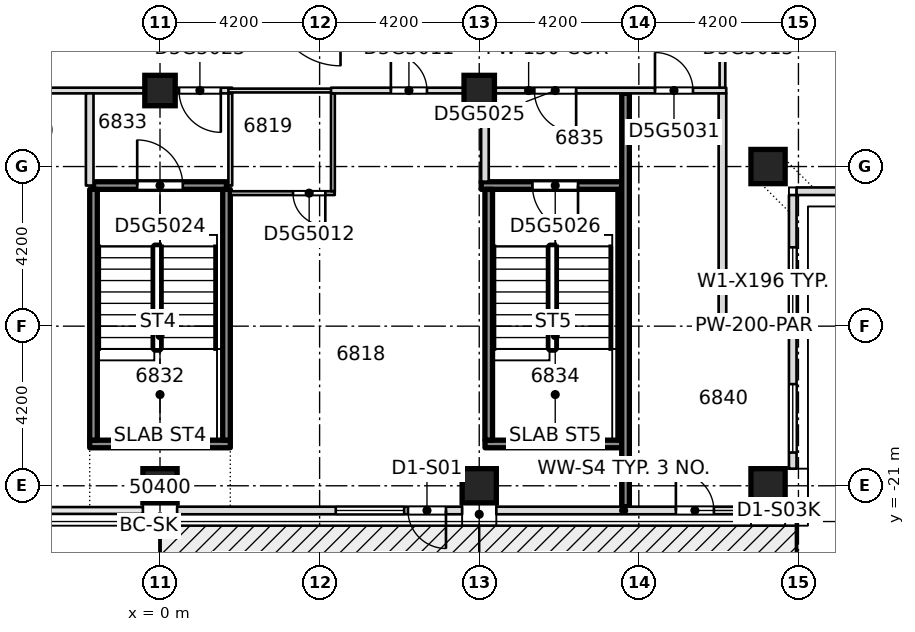
"""IFC4 building model, lengths in metres.
Left out: names, types, materials, properties, quantities, classifications, styles, units other than length and angle.
Written with IfcOpenShell. Run it as: python <this file> out.ifc"""

import sys

from ifc_helpers import new_model, si_unit, direction, frame, frame_2d, origin, origin_2d, place, context, subcontext, project, spatial, rectangle, extrude, element, fill, save


model = new_model("IFC4")
c1 = context("Model", 3, precision=1e-05, world=origin(), true_north=direction((0.0, 1.0)))
c2 = subcontext(c1, "Body", "Model", "MODEL_VIEW")
j1 = project(units=[si_unit("LENGTHUNIT", "METRE"), si_unit("PLANEANGLEUNIT", "RADIAN")], contexts=[c1])
p1 = place(None, origin())
s1 = spatial("IfcSite", under=j1, at=p1, CompositionType="ELEMENT")
p2 = place(p1, origin())
s2 = spatial("IfcBuilding", under=s1, at=p2, CompositionType="ELEMENT")
p3 = place(p2, frame((0.0, 0.0, 257.95)))
s3 = spatial("IfcBuildingStorey", under=s2, at=p3, CompositionType="ELEMENT", Elevation=257.95)
for number, where, z_axis, x_axis in (
    (1, (0.0, -21.0, -0.4), (0.0, 0.0, 1.0), (1.0, 0.0, 0.0)),
    (2, (8.4, -21.0, -0.4), (0.0, 0.0, 1.0), (1.0, 0.0, 0.0)),
    (3, (16.0, -21.0, -0.4), (0.0, 0.0, 1.0), (1.0, 0.0, 0.0)),
    (4, (16.0, -12.6, -0.4), (0.0, 0.0, 1.0), (1.0, 0.0, 0.0)),
):
    element("IfcColumn", number, at=place(p3, frame(where, z_axis=z_axis, x_axis=x_axis)), inside=s3, PredefinedType="COLUMN", context=c2, shape_type="SweptSolid", body=[
        extrude(rectangle(XDim=0.9, YDim=0.9, at=origin_2d()), origin(), (0.0, 0.0, 1.0), 3.45),
    ])
for number, where, z_axis, x_axis in (
    (5, (0.0, -10.6, -0.4), (0.0, 0.0, 1.0), (1.0, 0.0, 0.0)),
    (6, (8.4, -10.6, -0.4), (0.0, 0.0, 1.0), (1.0, 0.0, 0.0)),
):
    element("IfcColumn", number, at=place(p3, frame(where, z_axis=z_axis, x_axis=x_axis)), inside=s3, PredefinedType="COLUMN", context=c2, shape_type="SweptSolid", body=[
        extrude(rectangle(XDim=0.8, YDim=0.8, at=origin_2d()), origin(), (0.0, 0.0, 1.0), 3.45),
    ])
p4 = place(p3, frame((8.552, -19.9, 0.0), z_axis=(0.0, 0.0, 1.0), x_axis=(1.0, 0.0, 0.0)))
e7 = element("IfcWall", 7, at=p4, inside=s3, PredefinedType="SOLIDWALL", context=c2, shape_type="SweptSolid", body=[
    extrude(rectangle(XDim=3.696, YDim=0.2, at=frame_2d((1.848, 0.0))), origin(), (0.0, 0.0, 1.0), 3.05),
])
p5 = place(p3, frame((14.702, -16.8, 0.0), z_axis=(0.0, 0.0, 1.0), x_axis=(1.0, 0.0, 0.0)))
e8 = element("IfcWall", 8, at=p5, inside=s3, PredefinedType="PARTITIONING", context=c2, shape_type="SweptSolid", body=[
    extrude(rectangle(XDim=1.848, YDim=0.2, at=frame_2d((0.924, 0.0))), origin(), (0.0, 0.0, 1.0), 3.05),
])
p6 = place(p3, frame((1.85, -13.3, 0.0), z_axis=(0.0, 0.0, 1.0), x_axis=(1.0, 0.0, 0.0)))
e9 = element("IfcWall", 9, at=p6, inside=s3, PredefinedType="PARTITIONING", context=c2, shape_type="SweptSolid", body=[
    extrude(rectangle(XDim=2.748, YDim=0.1, at=frame_2d((1.374, 0.0))), origin(), (0.0, 0.0, 1.0), 3.05),
])
p7 = place(p6, frame((1.65, 0.0, 0.0)))
e10 = element("IfcOpeningElement", 10, at=p7, cuts=e9, PredefinedType="OPENING", context=c2, shape_type="SweptSolid", body=[
    extrude(rectangle(XDim=0.85, YDim=2.1, at=frame_2d((0.425, 1.05))), frame((0.0, 0.06, 0.0), z_axis=(0.0, -1.0, 0.0), x_axis=(1.0, 0.0, 0.0)), (0.0, 0.0, 1.0), 0.12),
])
p8 = place(p3, frame((-1.75, -13.1, 0.0), z_axis=(0.0, 0.0, 1.0), x_axis=(1.0, 0.0, 0.0)))
e11 = element("IfcWall", 11, at=p8, inside=s3, PredefinedType="SOLIDWALL", context=c2, shape_type="SweptSolid", body=[
    extrude(rectangle(XDim=3.5, YDim=0.2, at=frame_2d((1.75, 0.0))), origin(), (0.0, 0.0, 1.0), 3.05),
])
p9 = place(p8, frame((1.15, 0.0, 0.0)))
e12 = element("IfcOpeningElement", 12, at=p9, cuts=e11, PredefinedType="OPENING", context=c2, shape_type="SweptSolid", body=[
    extrude(rectangle(XDim=1.2, YDim=2.1, at=frame_2d((0.6, 1.05))), frame((0.0, 0.11, 0.0), z_axis=(0.0, -1.0, 0.0), x_axis=(1.0, 0.0, 0.0)), (0.0, 0.0, 1.0), 0.22),
])
p10 = place(p3, frame((8.452, -13.1, 0.0), z_axis=(0.0, 0.0, 1.0), x_axis=(1.0, 0.0, 0.0)))
e13 = element("IfcWall", 13, at=p10, inside=s3, PredefinedType="SOLIDWALL", context=c2, shape_type="SweptSolid", body=[
    extrude(rectangle(XDim=3.696, YDim=0.2, at=frame_2d((1.848, 0.0))), origin(), (0.0, 0.0, 1.0), 3.05),
])
p11 = place(p10, frame((1.348, 0.0, 0.0)))
e14 = element("IfcOpeningElement", 14, at=p11, cuts=e13, PredefinedType="OPENING", context=c2, shape_type="SweptSolid", body=[
    extrude(rectangle(XDim=1.2, YDim=2.1, at=frame_2d((0.6, 1.05))), frame((0.0, 0.11, 0.0), z_axis=(0.0, -1.0, 0.0), x_axis=(1.0, 0.0, 0.0)), (0.0, 0.0, 1.0), 0.22),
])
p12 = place(p3, frame((-6.2, -10.6, 0.0), z_axis=(0.0, 0.0, 1.0), x_axis=(1.0, 0.0, 0.0)))
e15 = element("IfcWall", 15, at=p12, inside=s3, PredefinedType="PARTITIONING", context=c2, shape_type="SweptSolid", body=[
    extrude(rectangle(XDim=8.1, YDim=0.15, at=frame_2d((4.05, 0.0))), origin(), (0.0, 0.0, 1.0), 3.05),
])
p13 = place(p12, frame((1.725, 0.0, 0.0)))
e16 = element("IfcOpeningElement", 16, at=p13, cuts=e15, PredefinedType="OPENING", context=c2, shape_type="SweptSolid", body=[
    extrude(rectangle(XDim=0.95, YDim=2.1, at=frame_2d((0.475, 1.05))), frame((0.0, 0.085, 0.0), z_axis=(0.0, -1.0, 0.0), x_axis=(1.0, 0.0, 0.0)), (0.0, 0.0, 1.0), 0.17),
])
p14 = place(p12, frame((6.7, 0.0, 0.0)))
e17 = element("IfcOpeningElement", 17, at=p14, cuts=e15, PredefinedType="OPENING", context=c2, shape_type="SweptSolid", body=[
    extrude(rectangle(XDim=1.1, YDim=2.1, at=frame_2d((0.55, 1.05))), frame((0.0, 0.085, 0.0), z_axis=(0.0, -1.0, 0.0), x_axis=(1.0, 0.0, 0.0)), (0.0, 0.0, 1.0), 0.17),
])
p15 = place(p3, frame((1.8, -10.6, 0.0), z_axis=(0.0, 0.0, 1.0), x_axis=(1.0, 0.0, 0.0)))
e18 = element("IfcWall", 18, at=p15, inside=s3, PredefinedType="PARTITIONING", context=c2, shape_type="SweptSolid", body=[
    extrude(rectangle(XDim=2.8, YDim=0.1, at=frame_2d((1.4, 0.0))), origin(), (0.0, 0.0, 1.0), 3.05),
])
p16 = place(p3, frame((4.5, -10.6, 0.0), z_axis=(0.0, 0.0, 1.0), x_axis=(1.0, 0.0, 0.0)))
e19 = element("IfcWall", 19, at=p16, inside=s3, PredefinedType="PARTITIONING", context=c2, shape_type="SweptSolid", body=[
    extrude(rectangle(XDim=10.4, YDim=0.15, at=frame_2d((5.2, 0.0))), origin(), (0.0, 0.0, 1.0), 3.05),
])
p17 = place(p16, frame((1.575, 0.0, 0.0)))
e20 = element("IfcOpeningElement", 20, at=p17, cuts=e19, PredefinedType="OPENING", context=c2, shape_type="SweptSolid", body=[
    extrude(rectangle(XDim=0.95, YDim=2.1, at=frame_2d((0.475, 1.05))), frame((0.0, 0.085, 0.0), z_axis=(0.0, -1.0, 0.0), x_axis=(1.0, 0.0, 0.0)), (0.0, 0.0, 1.0), 0.17),
])
p18 = place(p16, frame((5.35, 0.0, 0.0)))
e21 = element("IfcOpeningElement", 21, at=p18, cuts=e19, PredefinedType="OPENING", context=c2, shape_type="SweptSolid", body=[
    extrude(rectangle(XDim=1.1, YDim=2.1, at=frame_2d((0.55, 1.05))), frame((0.0, 0.085, 0.0), z_axis=(0.0, -1.0, 0.0), x_axis=(1.0, 0.0, 0.0)), (0.0, 0.0, 1.0), 0.17),
])
p19 = place(p16, frame((8.525, 0.0, 0.0)))
e22 = element("IfcOpeningElement", 22, at=p19, cuts=e19, PredefinedType="OPENING", context=c2, shape_type="SweptSolid", body=[
    extrude(rectangle(XDim=1.0, YDim=2.1, at=frame_2d((0.5, 1.05))), frame((0.0, 0.085, 0.0), z_axis=(0.0, -1.0, 0.0), x_axis=(1.0, 0.0, 0.0)), (0.0, 0.0, 1.0), 0.17),
])
p20 = place(p3, frame((-1.85, -13.1, 0.0), z_axis=(0.0, 0.0, 1.0), x_axis=(0.0, 1.0, 0.0)))
e23 = element("IfcWall", 23, at=p20, inside=s3, PredefinedType="PARTITIONING", context=c2, shape_type="SweptSolid", body=[
    extrude(rectangle(XDim=2.425, YDim=0.2, at=frame_2d((1.212, 0.0))), origin(), (0.0, 0.0, 1.0), 3.05),
])
p21 = place(p3, frame((1.85, -13.1, 0.0), z_axis=(0.0, 0.0, 1.0), x_axis=(0.0, 1.0, 0.0)))
e24 = element("IfcWall", 24, at=p21, inside=s3, PredefinedType="PARTITIONING", context=c2, shape_type="SweptSolid", body=[
    extrude(rectangle(XDim=2.425, YDim=0.1, at=frame_2d((1.212, 0.0))), origin(), (0.0, 0.0, 1.0), 3.05),
])
p22 = place(p3, frame((4.55, -13.248, 0.0), z_axis=(0.0, 0.0, 1.0), x_axis=(0.0, 1.0, 0.0)))
e25 = element("IfcWall", 25, at=p22, inside=s3, PredefinedType="PARTITIONING", context=c2, shape_type="SweptSolid", body=[
    extrude(rectangle(XDim=2.573, YDim=0.1, at=frame_2d((1.287, 0.0))), origin(), (0.0, 0.0, 1.0), 3.05),
])
p23 = place(p3, frame((8.55, -12.998, 0.0), z_axis=(0.0, 0.0, 1.0), x_axis=(0.0, 1.0, 0.0)))
e26 = element("IfcWall", 26, at=p23, inside=s3, PredefinedType="PARTITIONING", context=c2, shape_type="SweptSolid", body=[
    extrude(rectangle(XDim=2.323, YDim=0.2, at=frame_2d((1.162, 0.0))), origin(), (0.0, 0.0, 1.0), 3.05),
])
for number, where, z_axis, x_axis in (
    (27, (8.65, -19.798, 0.0), (0.0, 0.0, 1.0), (0.0, 1.0, 0.0)),
    (28, (12.15, -19.798, 0.0), (0.0, 0.0, 1.0), (0.0, 1.0, 0.0)),
):
    element("IfcWall", number, at=place(p3, frame(where, z_axis=z_axis, x_axis=x_axis)), inside=s3, PredefinedType="SOLIDWALL", context=c2, shape_type="SweptSolid", body=[
        extrude(rectangle(XDim=6.596, YDim=0.2, at=frame_2d((3.298, 0.0))), origin(), (0.0, 0.0, 1.0), 3.05),
    ])
p24 = place(p3, frame((14.8, -16.698, 0.0), z_axis=(0.0, 0.0, 1.0), x_axis=(0.0, 1.0, 0.0)))
e29 = element("IfcWall", 29, at=p24, inside=s3, PredefinedType="PARTITIONING", context=c2, shape_type="SweptSolid", body=[
    extrude(rectangle(XDim=6.023, YDim=0.2, at=frame_2d((3.011, 0.0))), origin(), (0.0, 0.0, 1.0), 3.05),
])
p25 = place(p3, frame((14.8, -10.525, 0.0), z_axis=(0.0, 0.0, 1.0), x_axis=(0.0, 1.0, 0.0)))
e30 = element("IfcWall", 30, at=p25, inside=s3, PredefinedType="PARTITIONING", context=c2, shape_type="SweptSolid", body=[
    extrude(rectangle(XDim=2.05, YDim=0.15, at=frame_2d((1.025, 0.0))), origin(), (0.0, 0.0, 1.0), 3.05),
])
p26 = place(p3, frame((0.45, -21.65, 0.0), z_axis=(0.0, 0.0, 1.0), x_axis=(1.0, 0.0, 0.0)))
e31 = element("IfcWall", 31, at=p26, inside=s3, PredefinedType="STANDARD", context=c2, shape_type="SweptSolid", body=[
    extrude(rectangle(XDim=7.5, YDim=0.2, at=frame_2d((3.75, 0.0))), origin(), (0.0, 0.0, 1.0), 3.05),
])
p27 = place(p26, frame((4.175, 0.0, 0.2)))
e32 = element("IfcOpeningElement", 32, at=p27, cuts=e31, PredefinedType="OPENING", context=c2, shape_type="SweptSolid", body=[
    extrude(rectangle(XDim=1.8, YDim=2.65, at=frame_2d((0.9, 1.325))), frame((0.0, 0.11, 0.0), z_axis=(0.0, -1.0, 0.0), x_axis=(1.0, 0.0, 0.0)), (0.0, 0.0, 1.0), 0.22),
])
p28 = place(p26, frame((6.075, 0.0, 0.0)))
e33 = element("IfcOpeningElement", 33, at=p28, cuts=e31, PredefinedType="OPENING", context=c2, shape_type="SweptSolid", body=[
    extrude(rectangle(XDim=1.0, YDim=2.4, at=frame_2d((0.5, 1.2))), frame((0.0, 0.11, 0.0), z_axis=(0.0, -1.0, 0.0), x_axis=(1.0, 0.0, 0.0)), (0.0, 0.0, 1.0), 0.22),
])
p29 = place(p3, frame((8.85, -21.65, 0.0), z_axis=(0.0, 0.0, 1.0), x_axis=(1.0, 0.0, 0.0)))
e34 = element("IfcWall", 34, at=p29, inside=s3, PredefinedType="STANDARD", context=c2, shape_type="SweptSolid", body=[
    extrude(rectangle(XDim=6.7, YDim=0.2, at=frame_2d((3.35, 0.0))), origin(), (0.0, 0.0, 1.0), 3.05),
])
p30 = place(p29, frame((4.725, 0.0, 0.0)))
e35 = element("IfcOpeningElement", 35, at=p30, cuts=e34, PredefinedType="OPENING", context=c2, shape_type="SweptSolid", body=[
    extrude(rectangle(XDim=1.0, YDim=2.4, at=frame_2d((0.5, 1.2))), frame((0.0, 0.11, 0.0), z_axis=(0.0, -1.0, 0.0), x_axis=(1.0, 0.0, 0.0)), (0.0, 0.0, 1.0), 0.22),
])
p31 = place(p3, frame((16.65, -20.55, 0.0), z_axis=(0.0, 0.0, 1.0), x_axis=(0.0, 1.0, 0.0)))
e36 = element("IfcWall", 36, at=p31, inside=s3, PredefinedType="STANDARD", context=c2, shape_type="SweptSolid", body=[
    extrude(rectangle(XDim=7.2, YDim=0.2, at=frame_2d((3.6, 0.0))), origin(), (0.0, 0.0, 1.0), 3.05),
])
p32 = place(p31, frame((0.425, 0.0, 0.2)))
e37 = element("IfcOpeningElement", 37, at=p32, cuts=e36, PredefinedType="OPENING", context=c2, shape_type="SweptSolid", body=[
    extrude(rectangle(XDim=1.8, YDim=2.65, at=frame_2d((0.9, 1.325))), frame((0.0, 0.11, 0.0), z_axis=(0.0, -1.0, 0.0), x_axis=(1.0, 0.0, 0.0)), (0.0, 0.0, 1.0), 0.22),
])
p33 = place(p31, frame((4.025, 0.0, 0.2)))
e38 = element("IfcOpeningElement", 38, at=p33, cuts=e36, PredefinedType="OPENING", context=c2, shape_type="SweptSolid", body=[
    extrude(rectangle(XDim=1.8, YDim=2.65, at=frame_2d((0.9, 1.325))), frame((0.0, 0.11, 0.0), z_axis=(0.0, -1.0, 0.0), x_axis=(1.0, 0.0, 0.0)), (0.0, 0.0, 1.0), 0.22),
])
p34 = place(p3, frame((16.75, -13.25, 0.0), z_axis=(0.0, 0.0, 1.0), x_axis=(1.0, 0.0, 0.0)))
e39 = element("IfcWall", 39, at=p34, inside=s3, PredefinedType="STANDARD", context=c2, shape_type="SweptSolid", body=[
    extrude(rectangle(XDim=8.0, YDim=0.2, at=frame_2d((4.0, 0.0))), origin(), (0.0, 0.0, 1.0), 3.05),
])
p35 = place(p3, frame((-1.85, -19.9, 0.0), z_axis=(0.0, 0.0, 1.0), x_axis=(1.0, 0.0, 0.0)))
e40 = element("IfcWall", 40, at=p35, inside=s3, PredefinedType="SOLIDWALL", context=c2, shape_type="SweptSolid", body=[
    extrude(rectangle(XDim=3.7, YDim=0.2, at=frame_2d((1.85, 0.0))), origin(), (0.0, 0.0, 1.0), 3.05),
])
for number, where, z_axis, x_axis in (
    (41, (-1.75, -19.8, 0.0), (0.0, 0.0, 1.0), (0.0, 1.0, 0.0)),
    (42, (1.75, -19.8, 0.0), (0.0, 0.0, 1.0), (0.0, 1.0, 0.0)),
):
    element("IfcWall", number, at=place(p3, frame(where, z_axis=z_axis, x_axis=x_axis)), inside=s3, PredefinedType="SOLIDWALL", context=c2, shape_type="SweptSolid", body=[
        extrude(rectangle(XDim=6.6, YDim=0.2, at=frame_2d((3.3, 0.0))), origin(), (0.0, 0.0, 1.0), 3.05),
    ])
p36 = place(p3, frame((12.25, -21.55, 0.0), z_axis=(0.0, 0.0, 1.0), x_axis=(0.0, 1.0, 0.0)))
e43 = element("IfcWall", 43, at=p36, inside=s3, PredefinedType="SOLIDWALL", context=c2, shape_type="SweptSolid", body=[
    extrude(rectangle(XDim=10.875, YDim=0.2, at=frame_2d((5.438, 0.0))), origin(), (0.0, 0.0, 1.0), 3.05),
])
p37 = place(p17, origin())
e44 = element("IfcDoor", 44, at=p37, inside=s3, OperationType="SINGLE_SWING_LEFT", PredefinedType="DOOR", context=c2, shape_type="SweptSolid", body=[
    extrude(rectangle(XDim=0.95, YDim=2.1, at=frame_2d((0.475, 1.05))), frame((0.0, 0.025, 0.0), z_axis=(0.0, -1.0, 0.0), x_axis=(1.0, 0.0, 0.0)), (0.0, 0.0, 1.0), 0.05),
])
fill(e20, e44)
p38 = place(p7, origin())
e45 = element("IfcDoor", 45, at=p38, inside=s3, OperationType="SINGLE_SWING_RIGHT", PredefinedType="DOOR", context=c2, shape_type="SweptSolid", body=[
    extrude(rectangle(XDim=0.85, YDim=2.1, at=frame_2d((0.425, 1.05))), frame((0.0, 0.025, 0.0), z_axis=(0.0, -1.0, 0.0), x_axis=(1.0, 0.0, 0.0)), (0.0, 0.0, 1.0), 0.05),
])
fill(e10, e45)
p39 = place(p14, origin())
e46 = element("IfcDoor", 46, at=p39, inside=s3, OperationType="SINGLE_SWING_LEFT", PredefinedType="DOOR", context=c2, shape_type="SweptSolid", body=[
    extrude(rectangle(XDim=1.1, YDim=2.1, at=frame_2d((0.55, 1.05))), frame((0.0, 0.025, 0.0), z_axis=(0.0, -1.0, 0.0), x_axis=(1.0, 0.0, 0.0)), (0.0, 0.0, 1.0), 0.05),
])
fill(e17, e46)
p40 = place(p9, origin())
e47 = element("IfcDoor", 47, at=p40, inside=s3, OperationType="SINGLE_SWING_RIGHT", PredefinedType="DOOR", context=c2, shape_type="SweptSolid", body=[
    extrude(rectangle(XDim=1.2, YDim=2.1, at=frame_2d((0.6, 1.05))), frame((0.0, 0.025, 0.0), z_axis=(0.0, -1.0, 0.0), x_axis=(1.0, 0.0, 0.0)), (0.0, 0.0, 1.0), 0.05),
])
fill(e12, e47)
p41 = place(p18, origin())
e48 = element("IfcDoor", 48, at=p41, inside=s3, OperationType="SINGLE_SWING_LEFT", PredefinedType="DOOR", context=c2, shape_type="SweptSolid", body=[
    extrude(rectangle(XDim=1.1, YDim=2.1, at=frame_2d((0.55, 1.05))), frame((0.0, 0.025, 0.0), z_axis=(0.0, -1.0, 0.0), x_axis=(1.0, 0.0, 0.0)), (0.0, 0.0, 1.0), 0.05),
])
fill(e21, e48)
p42 = place(p11, origin())
e49 = element("IfcDoor", 49, at=p42, inside=s3, OperationType="SINGLE_SWING_RIGHT", PredefinedType="DOOR", context=c2, shape_type="SweptSolid", body=[
    extrude(rectangle(XDim=1.2, YDim=2.1, at=frame_2d((0.6, 1.05))), frame((0.0, 0.025, 0.0), z_axis=(0.0, -1.0, 0.0), x_axis=(1.0, 0.0, 0.0)), (0.0, 0.0, 1.0), 0.05),
])
fill(e14, e49)
p43 = place(p19, origin())
e50 = element("IfcDoor", 50, at=p43, inside=s3, OperationType="SINGLE_SWING_LEFT", PredefinedType="DOOR", context=c2, shape_type="SweptSolid", body=[
    extrude(rectangle(XDim=1.0, YDim=2.1, at=frame_2d((0.5, 1.05))), frame((0.0, 0.025, 0.0), z_axis=(0.0, -1.0, 0.0), x_axis=(1.0, 0.0, 0.0)), (0.0, 0.0, 1.0), 0.05),
])
fill(e22, e50)
p44 = place(p27, origin())
e51 = element("IfcWindow", 51, at=p44, inside=s3, PartitioningType="SINGLE_PANEL", PredefinedType="WINDOW", context=c2, shape_type="SweptSolid", body=[
    extrude(rectangle(XDim=1.8, YDim=2.65, at=frame_2d((0.9, 1.325))), frame((0.0, 0.03, 0.0), z_axis=(0.0, -1.0, 0.0), x_axis=(1.0, 0.0, 0.0)), (0.0, 0.0, 1.0), 0.06),
])
fill(e32, e51)
p45 = place(p28, origin())
e52 = element("IfcDoor", 52, at=p45, inside=s3, OperationType="SINGLE_SWING_LEFT", PredefinedType="DOOR", context=c2, shape_type="SweptSolid", body=[
    extrude(rectangle(XDim=1.0, YDim=2.4, at=frame_2d((0.5, 1.2))), frame((0.0, 0.025, 0.0), z_axis=(0.0, -1.0, 0.0), x_axis=(1.0, 0.0, 0.0)), (0.0, 0.0, 1.0), 0.05),
])
fill(e33, e52)
p46 = place(p30, origin())
e53 = element("IfcDoor", 53, at=p46, inside=s3, OperationType="SINGLE_SWING_LEFT", PredefinedType="DOOR", context=c2, shape_type="SweptSolid", body=[
    extrude(rectangle(XDim=1.0, YDim=2.4, at=frame_2d((0.5, 1.2))), frame((0.0, 0.025, 0.0), z_axis=(0.0, -1.0, 0.0), x_axis=(1.0, 0.0, 0.0)), (0.0, 0.0, 1.0), 0.05),
])
fill(e35, e53)
p47 = place(p32, origin())
e54 = element("IfcWindow", 54, at=p47, inside=s3, PartitioningType="SINGLE_PANEL", PredefinedType="WINDOW", context=c2, shape_type="SweptSolid", body=[
    extrude(rectangle(XDim=1.8, YDim=2.65, at=frame_2d((0.9, 1.325))), frame((0.0, 0.03, 0.0), z_axis=(0.0, -1.0, 0.0), x_axis=(1.0, 0.0, 0.0)), (0.0, 0.0, 1.0), 0.06),
])
fill(e37, e54)
p48 = place(p33, origin())
e55 = element("IfcWindow", 55, at=p48, inside=s3, PartitioningType="SINGLE_PANEL", PredefinedType="WINDOW", context=c2, shape_type="SweptSolid", body=[
    extrude(rectangle(XDim=1.8, YDim=2.65, at=frame_2d((0.9, 1.325))), frame((0.0, 0.03, 0.0), z_axis=(0.0, -1.0, 0.0), x_axis=(1.0, 0.0, 0.0)), (0.0, 0.0, 1.0), 0.06),
])
fill(e38, e55)
save(model, sys.argv[1])
